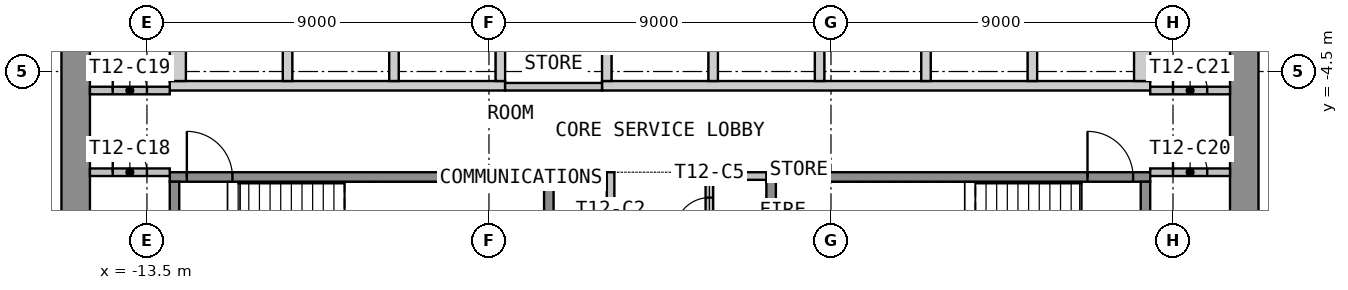
"""IFC4 building model, lengths in metres.
Left out: names, types, materials, properties, quantities, classifications, styles, units other than length and angle.
Written with IfcOpenShell. Run it as: python <this file> out.ifc"""

import sys

from ifc_helpers import new_model, si_unit, direction, frame, frame_2d, origin, place, context, subcontext, project, spatial, polyline, rectangle, outline, extrude, element, fill, save


model = new_model("IFC4")
c1 = context("Model", 3, precision=1e-05, world=origin(), true_north=direction((0.0, 1.0)))
c2 = subcontext(c1, "Body", "Model", "MODEL_VIEW")
j1 = project(units=[si_unit("LENGTHUNIT", "METRE"), si_unit("PLANEANGLEUNIT", "RADIAN")], contexts=[c1])
p1 = place(None, origin())
s1 = spatial("IfcSite", under=j1, at=p1, CompositionType="ELEMENT")
p2 = place(p1, origin())
s2 = spatial("IfcBuilding", under=s1, at=p2, CompositionType="ELEMENT")
p3 = place(p2, frame((0.0, 0.0, 167.7)))
s3 = spatial("IfcBuildingStorey", under=s2, at=p3, CompositionType="ELEMENT", Elevation=167.7)
p4 = place(p3, frame((-15.375, -12.75, 0.0), z_axis=(0.0, 0.0, 1.0), x_axis=(0.0, 1.0, 0.0)))
e1 = element("IfcWall", 1, at=p4, inside=s3, PredefinedType="SHEAR", context=c2, shape_type="SweptSolid", body=[
    extrude(rectangle(XDim=25.5, YDim=0.75, at=frame_2d((12.75, 0.0))), origin(), (0.0, 0.0, 1.0), 3.575),
])
p5 = place(p4, frame((11.55, 0.0, 0.0)))
e2 = element("IfcOpeningElement", 2, at=p5, cuts=e1, PredefinedType="OPENING", context=c2, shape_type="SweptSolid", body=[
    extrude(rectangle(XDim=2.4, YDim=2.1, at=frame_2d((1.2, 1.05))), frame((0.0, 0.385, 0.0), z_axis=(0.0, -1.0, 0.0), x_axis=(1.0, 0.0, 0.0)), (0.0, 0.0, 1.0), 0.77),
])
p6 = place(p3, frame((15.375, -12.75, 0.0), z_axis=(0.0, 0.0, 1.0), x_axis=(0.0, 1.0, 0.0)))
e3 = element("IfcWall", 3, at=p6, inside=s3, PredefinedType="SHEAR", context=c2, shape_type="SweptSolid", body=[
    extrude(rectangle(XDim=25.5, YDim=0.75, at=frame_2d((12.75, 0.0))), origin(), (0.0, 0.0, 1.0), 3.575),
])
p7 = place(p6, frame((11.55, 0.0, 0.0)))
e4 = element("IfcOpeningElement", 4, at=p7, cuts=e3, PredefinedType="OPENING", context=c2, shape_type="SweptSolid", body=[
    extrude(rectangle(XDim=2.4, YDim=2.1, at=frame_2d((1.2, 1.05))), frame((0.0, 0.385, 0.0), z_axis=(0.0, -1.0, 0.0), x_axis=(1.0, 0.0, 0.0)), (0.0, 0.0, 1.0), 0.77),
])
p8 = place(p3, origin())
e5 = element("IfcWall", 5, at=p8, inside=s3, PredefinedType="SHEAR", context=c2, shape_type="SweptSolid", body=[
    extrude(outline(polyline([(-12.9, -5.0), (-4.075, -5.0), (-4.075, -4.75), (-12.9, -4.75), (-12.9, -5.0)])), origin(), (0.0, 0.0, 1.0), 3.575),
])
p9 = place(p3, origin())
e6 = element("IfcWall", 6, at=p9, inside=s3, PredefinedType="SHEAR", context=c2, shape_type="SweptSolid", body=[
    extrude(outline(polyline([(-1.525, -5.0), (12.9, -5.0), (12.9, -4.75), (-1.525, -4.75), (-1.525, -5.0)])), origin(), (0.0, 0.0, 1.0), 3.575),
])
p10 = place(p3, origin())
e7 = element("IfcWall", 7, at=p10, inside=s3, PredefinedType="SHEAR", context=c2, shape_type="SweptSolid", body=[
    extrude(outline(polyline([(-12.9, -4.75), (-12.475, -4.75), (-12.475, -3.05), (-12.9, -3.05), (-12.9, -4.75)])), origin(), (0.0, 0.0, 1.0), 3.575),
])
p11 = place(p3, origin())
e8 = element("IfcWall", 8, at=p11, inside=s3, PredefinedType="SHEAR", context=c2, shape_type="SweptSolid", body=[
    extrude(outline(polyline([(-9.925, -4.75), (-9.675, -4.75), (-9.675, -3.05), (-9.925, -3.05), (-9.925, -4.75)])), origin(), (0.0, 0.0, 1.0), 3.575),
])
p12 = place(p3, origin())
e9 = element("IfcWall", 9, at=p12, inside=s3, PredefinedType="SHEAR", context=c2, shape_type="SweptSolid", body=[
    extrude(outline(polyline([(-7.125, -4.75), (-6.875, -4.75), (-6.875, -3.05), (-7.125, -3.05), (-7.125, -4.75)])), origin(), (0.0, 0.0, 1.0), 3.575),
])
p13 = place(p3, origin())
e10 = element("IfcWall", 10, at=p13, inside=s3, PredefinedType="SHEAR", context=c2, shape_type="SweptSolid", body=[
    extrude(outline(polyline([(-4.325, -4.75), (-4.075, -4.75), (-4.075, -3.05), (-4.325, -3.05), (-4.325, -4.75)])), origin(), (0.0, 0.0, 1.0), 3.575),
])
p14 = place(p3, origin())
e11 = element("IfcWall", 11, at=p14, inside=s3, PredefinedType="SHEAR", context=c2, shape_type="SweptSolid", body=[
    extrude(outline(polyline([(-1.525, -4.75), (-1.275, -4.75), (-1.275, -2.05), (-1.525, -2.05), (-1.525, -4.75)])), origin(), (0.0, 0.0, 1.0), 3.575),
])
p15 = place(p3, origin())
e12 = element("IfcWall", 12, at=p15, inside=s3, PredefinedType="SHEAR", context=c2, shape_type="SweptSolid", body=[
    extrude(outline(polyline([(1.275, -4.75), (1.525, -4.75), (1.525, -2.05), (1.275, -2.05), (1.275, -4.75)])), origin(), (0.0, 0.0, 1.0), 3.575),
])
p16 = place(p3, origin())
e13 = element("IfcWall", 13, at=p16, inside=s3, PredefinedType="SHEAR", context=c2, shape_type="SweptSolid", body=[
    extrude(outline(polyline([(4.075, -4.75), (4.325, -4.75), (4.325, -2.05), (4.075, -2.05), (4.075, -4.75)])), origin(), (0.0, 0.0, 1.0), 3.575),
])
p17 = place(p3, origin())
e14 = element("IfcWall", 14, at=p17, inside=s3, PredefinedType="SHEAR", context=c2, shape_type="SweptSolid", body=[
    extrude(outline(polyline([(6.875, -4.75), (7.125, -4.75), (7.125, -2.05), (6.875, -2.05), (6.875, -4.75)])), origin(), (0.0, 0.0, 1.0), 3.575),
])
p18 = place(p3, origin())
e15 = element("IfcWall", 15, at=p18, inside=s3, PredefinedType="SHEAR", context=c2, shape_type="SweptSolid", body=[
    extrude(outline(polyline([(9.675, -4.75), (9.925, -4.75), (9.925, -2.05), (9.675, -2.05), (9.675, -4.75)])), origin(), (0.0, 0.0, 1.0), 3.575),
])
p19 = place(p3, origin())
e16 = element("IfcWall", 16, at=p19, inside=s3, PredefinedType="SHEAR", context=c2, shape_type="SweptSolid", body=[
    extrude(outline(polyline([(12.475, -4.75), (12.9, -4.75), (12.9, -2.05), (12.475, -2.05), (12.475, -4.75)])), origin(), (0.0, 0.0, 1.0), 3.575),
])
p20 = place(p3, frame((-12.9, -7.275, 0.0), z_axis=(0.0, 0.0, 1.0), x_axis=(1.0, 0.0, 0.0)))
e17 = element("IfcWall", 17, at=p20, inside=s3, PredefinedType="SHEAR", context=c2, shape_type="SweptSolid", body=[
    extrude(rectangle(XDim=10.1, YDim=0.25, at=frame_2d((5.05, 0.0))), origin(), (0.0, 0.0, 1.0), 3.575),
])
p21 = place(p20, frame((0.45, 0.0, 0.0)))
e18 = element("IfcOpeningElement", 18, at=p21, cuts=e17, PredefinedType="OPENING", context=c2, shape_type="SweptSolid", body=[
    extrude(rectangle(XDim=1.2, YDim=2.1, at=frame_2d((0.6, 1.05))), frame((0.0, 0.135, 0.0), z_axis=(0.0, -1.0, 0.0), x_axis=(1.0, 0.0, 0.0)), (0.0, 0.0, 1.0), 0.27),
])
for number, where, z_axis, x_axis in (
    (19, (-12.775, -10.65, 0.0), (0.0, 0.0, 1.0), (0.0, 1.0, 0.0)),
    (20, (-2.925, -10.65, 0.0), (0.0, 0.0, 1.0), (0.0, 1.0, 0.0)),
):
    element("IfcWall", number, at=place(p3, frame(where, z_axis=z_axis, x_axis=x_axis)), inside=s3, PredefinedType="SHEAR", context=c2, shape_type="SweptSolid", body=[
        extrude(rectangle(XDim=3.25, YDim=0.25, at=frame_2d((1.625, 0.0))), origin(), (0.0, 0.0, 1.0), 3.575),
    ])
p22 = place(p3, frame((2.8, -7.275, 0.0), z_axis=(0.0, 0.0, 1.0), x_axis=(1.0, 0.0, 0.0)))
e21 = element("IfcWall", 21, at=p22, inside=s3, PredefinedType="SHEAR", context=c2, shape_type="SweptSolid", body=[
    extrude(rectangle(XDim=10.1, YDim=0.25, at=frame_2d((5.05, 0.0))), origin(), (0.0, 0.0, 1.0), 3.575),
])
p23 = place(p22, frame((8.45, 0.0, 0.0)))
e22 = element("IfcOpeningElement", 22, at=p23, cuts=e21, PredefinedType="OPENING", context=c2, shape_type="SweptSolid", body=[
    extrude(rectangle(XDim=1.2, YDim=2.1, at=frame_2d((0.6, 1.05))), frame((0.0, 0.135, 0.0), z_axis=(0.0, -1.0, 0.0), x_axis=(1.0, 0.0, 0.0)), (0.0, 0.0, 1.0), 0.27),
])
for number, where, z_axis, x_axis in (
    (23, (2.925, -10.65, 0.0), (0.0, 0.0, 1.0), (0.0, 1.0, 0.0)),
    (24, (12.775, -10.65, 0.0), (0.0, 0.0, 1.0), (0.0, 1.0, 0.0)),
):
    element("IfcWall", number, at=place(p3, frame(where, z_axis=z_axis, x_axis=x_axis)), inside=s3, PredefinedType="SHEAR", context=c2, shape_type="SweptSolid", body=[
        extrude(rectangle(XDim=3.25, YDim=0.25, at=frame_2d((1.625, 0.0))), origin(), (0.0, 0.0, 1.0), 3.575),
    ])
for number, where, z_axis, x_axis in (
    (25, (-2.8, -7.25, 0.0), (0.0, 0.0, 1.0), (1.0, 0.0, 0.0)),
    (26, (1.4, -7.25, 0.0), (0.0, 0.0, 1.0), (1.0, 0.0, 0.0)),
):
    element("IfcWall", number, at=place(p3, frame(where, z_axis=z_axis, x_axis=x_axis)), inside=s3, PredefinedType="PARTITIONING", context=c2, shape_type="SweptSolid", body=[
        extrude(rectangle(XDim=1.4, YDim=0.2, at=frame_2d((0.7, 0.0))), origin(), (0.0, 0.0, 1.0), 3.575),
    ])
p24 = place(p3, frame((-1.3, -12.75, 0.0), z_axis=(0.0, 0.0, 1.0), x_axis=(0.0, 1.0, 0.0)))
e27 = element("IfcWall", 27, at=p24, inside=s3, PredefinedType="PARTITIONING", context=c2, shape_type="SweptSolid", body=[
    extrude(rectangle(XDim=5.6, YDim=0.2, at=frame_2d((2.8, 0.0))), origin(), (0.0, 0.0, 1.0), 3.575),
])
p25 = place(p24, frame((0.36, 0.0, 0.0)))
e28 = element("IfcOpeningElement", 28, at=p25, cuts=e27, PredefinedType="OPENING", context=c2, shape_type="SweptSolid", body=[
    extrude(rectangle(XDim=0.9, YDim=2.1, at=frame_2d((0.45, 1.05))), frame((0.0, 0.11, 0.0), z_axis=(0.0, -1.0, 0.0), x_axis=(1.0, 0.0, 0.0)), (0.0, 0.0, 1.0), 0.22),
])
p26 = place(p24, frame((3.06, 0.0, 0.0)))
e29 = element("IfcOpeningElement", 29, at=p26, cuts=e27, PredefinedType="OPENING", context=c2, shape_type="SweptSolid", body=[
    extrude(rectangle(XDim=0.9, YDim=2.1, at=frame_2d((0.45, 1.05))), frame((0.0, 0.11, 0.0), z_axis=(0.0, -1.0, 0.0), x_axis=(1.0, 0.0, 0.0)), (0.0, 0.0, 1.0), 0.22),
])
p27 = place(p3, frame((1.3, -12.75, 0.0), z_axis=(0.0, 0.0, 1.0), x_axis=(0.0, 1.0, 0.0)))
e30 = element("IfcWall", 30, at=p27, inside=s3, PredefinedType="PARTITIONING", context=c2, shape_type="SweptSolid", body=[
    extrude(rectangle(XDim=5.6, YDim=0.2, at=frame_2d((2.8, 0.0))), origin(), (0.0, 0.0, 1.0), 3.575),
])
p28 = place(p27, frame((0.441, 0.0, 0.0)))
e31 = element("IfcOpeningElement", 31, at=p28, cuts=e30, PredefinedType="OPENING", context=c2, shape_type="SweptSolid", body=[
    extrude(rectangle(XDim=0.9, YDim=2.1, at=frame_2d((0.45, 1.05))), frame((0.0, 0.11, 0.0), z_axis=(0.0, -1.0, 0.0), x_axis=(1.0, 0.0, 0.0)), (0.0, 0.0, 1.0), 0.22),
])
p29 = place(p27, frame((2.223, 0.0, 0.0)))
e32 = element("IfcOpeningElement", 32, at=p29, cuts=e30, PredefinedType="OPENING", context=c2, shape_type="SweptSolid", body=[
    extrude(rectangle(XDim=0.9, YDim=2.1, at=frame_2d((0.45, 1.05))), frame((0.0, 0.11, 0.0), z_axis=(0.0, -1.0, 0.0), x_axis=(1.0, 0.0, 0.0)), (0.0, 0.0, 1.0), 0.22),
])
p30 = place(p27, frame((4.032, 0.0, 0.0)))
e33 = element("IfcOpeningElement", 33, at=p30, cuts=e30, PredefinedType="OPENING", context=c2, shape_type="SweptSolid", body=[
    extrude(rectangle(XDim=0.9, YDim=2.1, at=frame_2d((0.45, 1.05))), frame((0.0, 0.11, 0.0), z_axis=(0.0, -1.0, 0.0), x_axis=(1.0, 0.0, 0.0)), (0.0, 0.0, 1.0), 0.22),
])
p31 = place(p3, frame((-15.0, -7.15, 0.0), z_axis=(0.0, 0.0, 1.0), x_axis=(1.0, 0.0, 0.0)))
e34 = element("IfcWall", 34, at=p31, inside=s3, PredefinedType="PARTITIONING", context=c2, shape_type="SweptSolid", body=[
    extrude(rectangle(XDim=2.1, YDim=0.2, at=frame_2d((1.05, 0.0))), origin(), (0.0, 0.0, 1.0), 3.575),
])
p32 = place(p31, frame((0.6, 0.0, 0.0)))
e35 = element("IfcOpeningElement", 35, at=p32, cuts=e34, PredefinedType="OPENING", context=c2, shape_type="SweptSolid", body=[
    extrude(rectangle(XDim=0.9, YDim=2.1, at=frame_2d((0.45, 1.05))), frame((0.0, 0.11, 0.0), z_axis=(0.0, -1.0, 0.0), x_axis=(1.0, 0.0, 0.0)), (0.0, 0.0, 1.0), 0.22),
])
p33 = place(p3, frame((-15.0, -5.0, 0.0), z_axis=(0.0, 0.0, 1.0), x_axis=(1.0, 0.0, 0.0)))
e36 = element("IfcWall", 36, at=p33, inside=s3, PredefinedType="PARTITIONING", context=c2, shape_type="SweptSolid", body=[
    extrude(rectangle(XDim=2.1, YDim=0.2, at=frame_2d((1.05, 0.0))), origin(), (0.0, 0.0, 1.0), 3.575),
])
p34 = place(p33, frame((0.6, 0.0, 0.0)))
e37 = element("IfcOpeningElement", 37, at=p34, cuts=e36, PredefinedType="OPENING", context=c2, shape_type="SweptSolid", body=[
    extrude(rectangle(XDim=0.9, YDim=2.1, at=frame_2d((0.45, 1.05))), frame((0.0, 0.11, 0.0), z_axis=(0.0, -1.0, 0.0), x_axis=(1.0, 0.0, 0.0)), (0.0, 0.0, 1.0), 0.22),
])
p35 = place(p3, frame((12.9, -7.15, 0.0), z_axis=(0.0, 0.0, 1.0), x_axis=(1.0, 0.0, 0.0)))
e38 = element("IfcWall", 38, at=p35, inside=s3, PredefinedType="PARTITIONING", context=c2, shape_type="SweptSolid", body=[
    extrude(rectangle(XDim=2.1, YDim=0.2, at=frame_2d((1.05, 0.0))), origin(), (0.0, 0.0, 1.0), 3.575),
])
p36 = place(p35, frame((0.6, 0.0, 0.0)))
e39 = element("IfcOpeningElement", 39, at=p36, cuts=e38, PredefinedType="OPENING", context=c2, shape_type="SweptSolid", body=[
    extrude(rectangle(XDim=0.9, YDim=2.1, at=frame_2d((0.45, 1.05))), frame((0.0, 0.11, 0.0), z_axis=(0.0, -1.0, 0.0), x_axis=(1.0, 0.0, 0.0)), (0.0, 0.0, 1.0), 0.22),
])
p37 = place(p3, frame((12.9, -5.0, 0.0), z_axis=(0.0, 0.0, 1.0), x_axis=(1.0, 0.0, 0.0)))
e40 = element("IfcWall", 40, at=p37, inside=s3, PredefinedType="PARTITIONING", context=c2, shape_type="SweptSolid", body=[
    extrude(rectangle(XDim=2.1, YDim=0.2, at=frame_2d((1.05, 0.0))), origin(), (0.0, 0.0, 1.0), 3.575),
])
p38 = place(p37, frame((0.6, 0.0, 0.0)))
e41 = element("IfcOpeningElement", 41, at=p38, cuts=e40, PredefinedType="OPENING", context=c2, shape_type="SweptSolid", body=[
    extrude(rectangle(XDim=0.9, YDim=2.1, at=frame_2d((0.45, 1.05))), frame((0.0, 0.11, 0.0), z_axis=(0.0, -1.0, 0.0), x_axis=(1.0, 0.0, 0.0)), (0.0, 0.0, 1.0), 0.22),
])
p39 = place(p3, frame((-4.075, -4.9, 0.0), z_axis=(0.0, 0.0, 1.0), x_axis=(1.0, 0.0, 0.0)))
e42 = element("IfcWall", 42, at=p39, inside=s3, PredefinedType="PARTITIONING", context=c2, shape_type="SweptSolid", body=[
    extrude(rectangle(XDim=2.55, YDim=0.2, at=frame_2d((1.275, 0.0))), origin(), (0.0, 0.0, 1.0), 3.575),
])
p40 = place(p21, origin())
e43 = element("IfcDoor", 43, at=p40, inside=s3, OperationType="SINGLE_SWING_LEFT", PredefinedType="DOOR", context=c2, shape_type="SweptSolid", body=[
    extrude(rectangle(XDim=1.2, YDim=2.1, at=frame_2d((0.6, 1.05))), frame((0.0, 0.025, 0.0), z_axis=(0.0, -1.0, 0.0), x_axis=(1.0, 0.0, 0.0)), (0.0, 0.0, 1.0), 0.05),
])
fill(e18, e43)
p41 = place(p23, origin())
e44 = element("IfcDoor", 44, at=p41, inside=s3, OperationType="SINGLE_SWING_LEFT", PredefinedType="DOOR", context=c2, shape_type="SweptSolid", body=[
    extrude(rectangle(XDim=1.2, YDim=2.1, at=frame_2d((0.6, 1.05))), frame((0.0, 0.025, 0.0), z_axis=(0.0, -1.0, 0.0), x_axis=(1.0, 0.0, 0.0)), (0.0, 0.0, 1.0), 0.05),
])
fill(e22, e44)
p42 = place(p30, origin())
e45 = element("IfcDoor", 45, at=p42, inside=s3, OperationType="SINGLE_SWING_LEFT", PredefinedType="DOOR", context=c2, shape_type="SweptSolid", body=[
    extrude(rectangle(XDim=0.9, YDim=2.1, at=frame_2d((0.45, 1.05))), frame((0.0, 0.025, 0.0), z_axis=(0.0, -1.0, 0.0), x_axis=(1.0, 0.0, 0.0)), (0.0, 0.0, 1.0), 0.05),
])
fill(e33, e45)
p43 = place(p32, origin())
e46 = element("IfcDoor", 46, at=p43, inside=s3, OperationType="SINGLE_SWING_LEFT", PredefinedType="DOOR", context=c2, shape_type="SweptSolid", body=[
    extrude(rectangle(XDim=0.9, YDim=2.1, at=frame_2d((0.45, 1.05))), frame((0.0, 0.025, 0.0), z_axis=(0.0, -1.0, 0.0), x_axis=(1.0, 0.0, 0.0)), (0.0, 0.0, 1.0), 0.05),
])
fill(e35, e46)
p44 = place(p34, origin())
e47 = element("IfcDoor", 47, at=p44, inside=s3, OperationType="SINGLE_SWING_LEFT", PredefinedType="DOOR", context=c2, shape_type="SweptSolid", body=[
    extrude(rectangle(XDim=0.9, YDim=2.1, at=frame_2d((0.45, 1.05))), frame((0.0, 0.025, 0.0), z_axis=(0.0, -1.0, 0.0), x_axis=(1.0, 0.0, 0.0)), (0.0, 0.0, 1.0), 0.05),
])
fill(e37, e47)
p45 = place(p36, origin())
e48 = element("IfcDoor", 48, at=p45, inside=s3, OperationType="SINGLE_SWING_LEFT", PredefinedType="DOOR", context=c2, shape_type="SweptSolid", body=[
    extrude(rectangle(XDim=0.9, YDim=2.1, at=frame_2d((0.45, 1.05))), frame((0.0, 0.025, 0.0), z_axis=(0.0, -1.0, 0.0), x_axis=(1.0, 0.0, 0.0)), (0.0, 0.0, 1.0), 0.05),
])
fill(e39, e48)
p46 = place(p38, origin())
e49 = element("IfcDoor", 49, at=p46, inside=s3, OperationType="SINGLE_SWING_LEFT", PredefinedType="DOOR", context=c2, shape_type="SweptSolid", body=[
    extrude(rectangle(XDim=0.9, YDim=2.1, at=frame_2d((0.45, 1.05))), frame((0.0, 0.025, 0.0), z_axis=(0.0, -1.0, 0.0), x_axis=(1.0, 0.0, 0.0)), (0.0, 0.0, 1.0), 0.05),
])
fill(e41, e49)
save(model, sys.argv[1])
